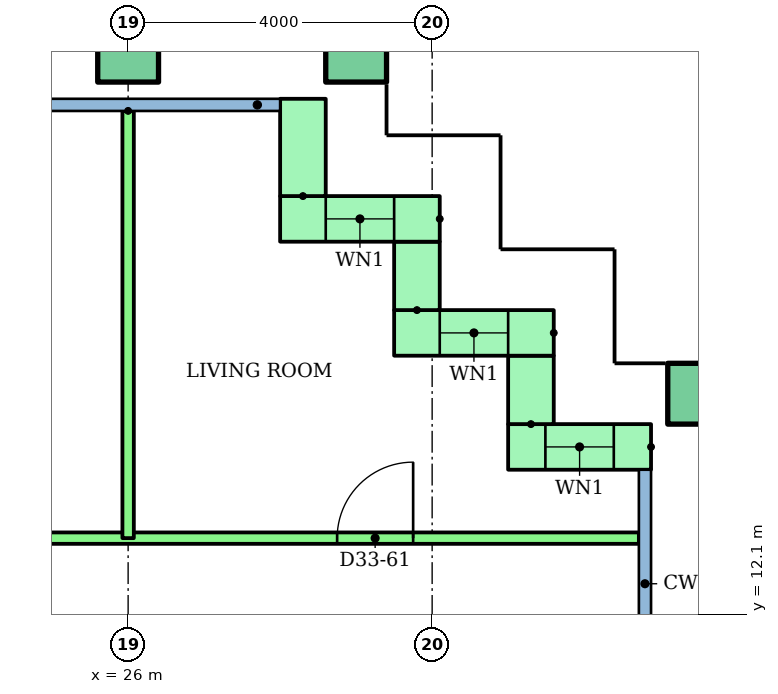
"""IFC4 building model, lengths in metres.
Left out: names, types, materials, properties, quantities, classifications, styles, units other than length and angle.
Written with IfcOpenShell. Run it as: python <this file> out.ifc"""

import sys

from ifc_helpers import new_model, si_unit, direction, frame, frame_2d, origin, origin_2d, place, context, subcontext, project, spatial, rectangle, hollow_rectangle, extrude, element, fill, save


model = new_model("IFC4")
c1 = context("Model", 3, precision=1e-05, world=origin(), true_north=direction((0.0, 1.0)))
c2 = subcontext(c1, "Body", "Model", "MODEL_VIEW")
j1 = project(units=[si_unit("LENGTHUNIT", "METRE"), si_unit("PLANEANGLEUNIT", "RADIAN")], contexts=[c1])
p1 = place(None, origin())
s1 = spatial("IfcSite", under=j1, at=p1, CompositionType="ELEMENT")
p2 = place(p1, origin())
s2 = spatial("IfcBuilding", under=s1, at=p2, CompositionType="ELEMENT")
p3 = place(p2, frame((0.0, 0.0, 129.4)))
s3 = spatial("IfcBuildingStorey", under=s2, at=p3, CompositionType="ELEMENT", Elevation=129.4)
for number, where in (
    (1, (33.5, 15.0, 0.0)),
    (2, (26.0, 19.5, 0.0)),
    (3, (29.0, 19.5, 0.0)),
):
    element("IfcColumn", number, at=place(p3, frame(where)), inside=s3, PredefinedType="COLUMN", context=c2, shape_type="SweptSolid", body=[
        extrude(hollow_rectangle(XDim=0.8, YDim=0.8, WallThickness=0.04, at=origin_2d()), origin(), (0.0, 0.0, 1.0), 3.2),
    ])
p4 = place(p3, frame((32.88, 14.3, 0.0), z_axis=(0.0, 0.0, 1.0), x_axis=(-1.0, 0.0, 0.0)))
e4 = element("IfcWall", 4, at=p4, inside=s3, PredefinedType="STANDARD", context=c2, shape_type="SweptSolid", body=[
    extrude(rectangle(XDim=1.88, YDim=0.6, at=frame_2d((0.94, 0.0))), origin(), (0.0, 0.0, 1.0), 2.92),
])
p5 = place(p4, frame((0.49, 0.0, 0.9)))
e5 = element("IfcOpeningElement", 5, at=p5, cuts=e4, PredefinedType="OPENING", context=c2, shape_type="SweptSolid", body=[
    extrude(rectangle(XDim=0.9, YDim=1.5, at=frame_2d((0.45, 0.75))), frame((0.0, 0.31, 0.0), z_axis=(0.0, -1.0, 0.0), x_axis=(1.0, 0.0, 0.0)), (0.0, 0.0, 1.0), 0.62),
])
p6 = place(p3, frame((31.3, 14.6, 0.0), z_axis=(0.0, 0.0, 1.0), x_axis=(0.0, 1.0, 0.0)))
e6 = element("IfcWall", 6, at=p6, inside=s3, PredefinedType="STANDARD", context=c2, shape_type="SweptSolid", body=[
    extrude(rectangle(XDim=0.9, YDim=0.6, at=frame_2d((0.45, 0.0))), origin(), (0.0, 0.0, 1.0), 2.92),
])
p7 = place(p3, frame((31.6, 15.8, 0.0), z_axis=(0.0, 0.0, 1.0), x_axis=(-1.0, 0.0, 0.0)))
e7 = element("IfcWall", 7, at=p7, inside=s3, PredefinedType="STANDARD", context=c2, shape_type="SweptSolid", body=[
    extrude(rectangle(XDim=2.1, YDim=0.6, at=frame_2d((1.05, 0.0))), origin(), (0.0, 0.0, 1.0), 2.92),
])
p8 = place(p7, frame((0.6, 0.0, 0.9)))
e8 = element("IfcOpeningElement", 8, at=p8, cuts=e7, PredefinedType="OPENING", context=c2, shape_type="SweptSolid", body=[
    extrude(rectangle(XDim=0.9, YDim=1.5, at=frame_2d((0.45, 0.75))), frame((0.0, 0.31, 0.0), z_axis=(0.0, -1.0, 0.0), x_axis=(1.0, 0.0, 0.0)), (0.0, 0.0, 1.0), 0.62),
])
p9 = place(p3, frame((29.8, 16.1, 0.0), z_axis=(0.0, 0.0, 1.0), x_axis=(0.0, 1.0, 0.0)))
e9 = element("IfcWall", 9, at=p9, inside=s3, PredefinedType="STANDARD", context=c2, shape_type="SweptSolid", body=[
    extrude(rectangle(XDim=0.9, YDim=0.6, at=frame_2d((0.45, 0.0))), origin(), (0.0, 0.0, 1.0), 2.92),
])
p10 = place(p3, frame((30.1, 17.3, 0.0), z_axis=(0.0, 0.0, 1.0), x_axis=(-1.0, 0.0, 0.0)))
e10 = element("IfcWall", 10, at=p10, inside=s3, PredefinedType="STANDARD", context=c2, shape_type="SweptSolid", body=[
    extrude(rectangle(XDim=2.1, YDim=0.6, at=frame_2d((1.05, 0.0))), origin(), (0.0, 0.0, 1.0), 2.92),
])
p11 = place(p10, frame((0.6, 0.0, 0.9)))
e11 = element("IfcOpeningElement", 11, at=p11, cuts=e10, PredefinedType="OPENING", context=c2, shape_type="SweptSolid", body=[
    extrude(rectangle(XDim=0.9, YDim=1.5, at=frame_2d((0.45, 0.75))), frame((0.0, 0.31, 0.0), z_axis=(0.0, -1.0, 0.0), x_axis=(1.0, 0.0, 0.0)), (0.0, 0.0, 1.0), 0.62),
])
p12 = place(p3, frame((28.3, 17.6, 0.0), z_axis=(0.0, 0.0, 1.0), x_axis=(0.0, 1.0, 0.0)))
e12 = element("IfcWall", 12, at=p12, inside=s3, PredefinedType="STANDARD", context=c2, shape_type="SweptSolid", body=[
    extrude(rectangle(XDim=1.28, YDim=0.6, at=frame_2d((0.64, 0.0))), origin(), (0.0, 0.0, 1.0), 2.92),
])
p13 = place(p3, frame((14.0, 13.1, 0.0)))
e13 = element("IfcWall", 13, at=p13, inside=s3, PredefinedType="PARTITIONING", context=c2, shape_type="SweptSolid", body=[
    extrude(rectangle(XDim=18.72, YDim=0.15, at=frame_2d((9.36, 0.0))), origin(), (0.0, 0.0, 1.0), 2.4),
])
p14 = place(p13, frame((1.55, 0.0, 0.0)))
e14 = element("IfcOpeningElement", 14, at=p14, cuts=e13, PredefinedType="OPENING", context=c2, shape_type="SweptSolid", body=[
    extrude(rectangle(XDim=0.9, YDim=2.1, at=frame_2d((0.45, 1.05))), frame((0.0, 0.085, 0.0), z_axis=(0.0, -1.0, 0.0), x_axis=(1.0, 0.0, 0.0)), (0.0, 0.0, 1.0), 0.17),
])
p15 = place(p13, frame((7.55, 0.0, 0.0)))
e15 = element("IfcOpeningElement", 15, at=p15, cuts=e13, PredefinedType="OPENING", context=c2, shape_type="SweptSolid", body=[
    extrude(rectangle(XDim=0.9, YDim=2.1, at=frame_2d((0.45, 1.05))), frame((0.0, 0.085, 0.0), z_axis=(0.0, -1.0, 0.0), x_axis=(1.0, 0.0, 0.0)), (0.0, 0.0, 1.0), 0.17),
])
p16 = place(p13, frame((14.75, 0.0, 0.0)))
e16 = element("IfcOpeningElement", 16, at=p16, cuts=e13, PredefinedType="OPENING", context=c2, shape_type="SweptSolid", body=[
    extrude(rectangle(XDim=1.0, YDim=2.1, at=frame_2d((0.5, 1.05))), frame((0.0, 0.085, 0.0), z_axis=(0.0, -1.0, 0.0), x_axis=(1.0, 0.0, 0.0)), (0.0, 0.0, 1.0), 0.17),
])
p17 = place(p3, frame((26.0, 18.721, 0.0), z_axis=(0.0, 0.0, 1.0), x_axis=(0.0, -1.0, 0.0)))
e17 = element("IfcWall", 17, at=p17, inside=s3, PredefinedType="PARTITIONING", context=c2, shape_type="SweptSolid", body=[
    extrude(rectangle(XDim=5.621, YDim=0.15, at=frame_2d((2.811, 0.0))), origin(), (0.0, 0.0, 1.0), 2.4),
])
p18 = place(p5, origin())
e18 = element("IfcWindow", 18, at=p18, inside=s3, PartitioningType="SINGLE_PANEL", PredefinedType="WINDOW", context=c2, shape_type="SweptSolid", body=[
    extrude(rectangle(XDim=0.9, YDim=1.5, at=frame_2d((0.45, 0.75))), frame((0.0, 0.03, 0.0), z_axis=(0.0, -1.0, 0.0), x_axis=(1.0, 0.0, 0.0)), (0.0, 0.0, 1.0), 0.06),
])
fill(e5, e18)
p19 = place(p8, origin())
e19 = element("IfcWindow", 19, at=p19, inside=s3, PartitioningType="SINGLE_PANEL", PredefinedType="WINDOW", context=c2, shape_type="SweptSolid", body=[
    extrude(rectangle(XDim=0.9, YDim=1.5, at=frame_2d((0.45, 0.75))), frame((0.0, 0.03, 0.0), z_axis=(0.0, -1.0, 0.0), x_axis=(1.0, 0.0, 0.0)), (0.0, 0.0, 1.0), 0.06),
])
fill(e8, e19)
p20 = place(p11, origin())
e20 = element("IfcWindow", 20, at=p20, inside=s3, PartitioningType="SINGLE_PANEL", PredefinedType="WINDOW", context=c2, shape_type="SweptSolid", body=[
    extrude(rectangle(XDim=0.9, YDim=1.5, at=frame_2d((0.45, 0.75))), frame((0.0, 0.03, 0.0), z_axis=(0.0, -1.0, 0.0), x_axis=(1.0, 0.0, 0.0)), (0.0, 0.0, 1.0), 0.06),
])
fill(e11, e20)
p21 = place(p16, origin())
e21 = element("IfcDoor", 21, at=p21, inside=s3, OperationType="SINGLE_SWING_RIGHT", PredefinedType="DOOR", context=c2, shape_type="SweptSolid", body=[
    extrude(rectangle(XDim=1.0, YDim=2.1, at=frame_2d((0.5, 1.05))), frame((0.0, 0.025, 0.0), z_axis=(0.0, -1.0, 0.0), x_axis=(1.0, 0.0, 0.0)), (0.0, 0.0, 1.0), 0.05),
])
fill(e16, e21)
save(model, sys.argv[1])
